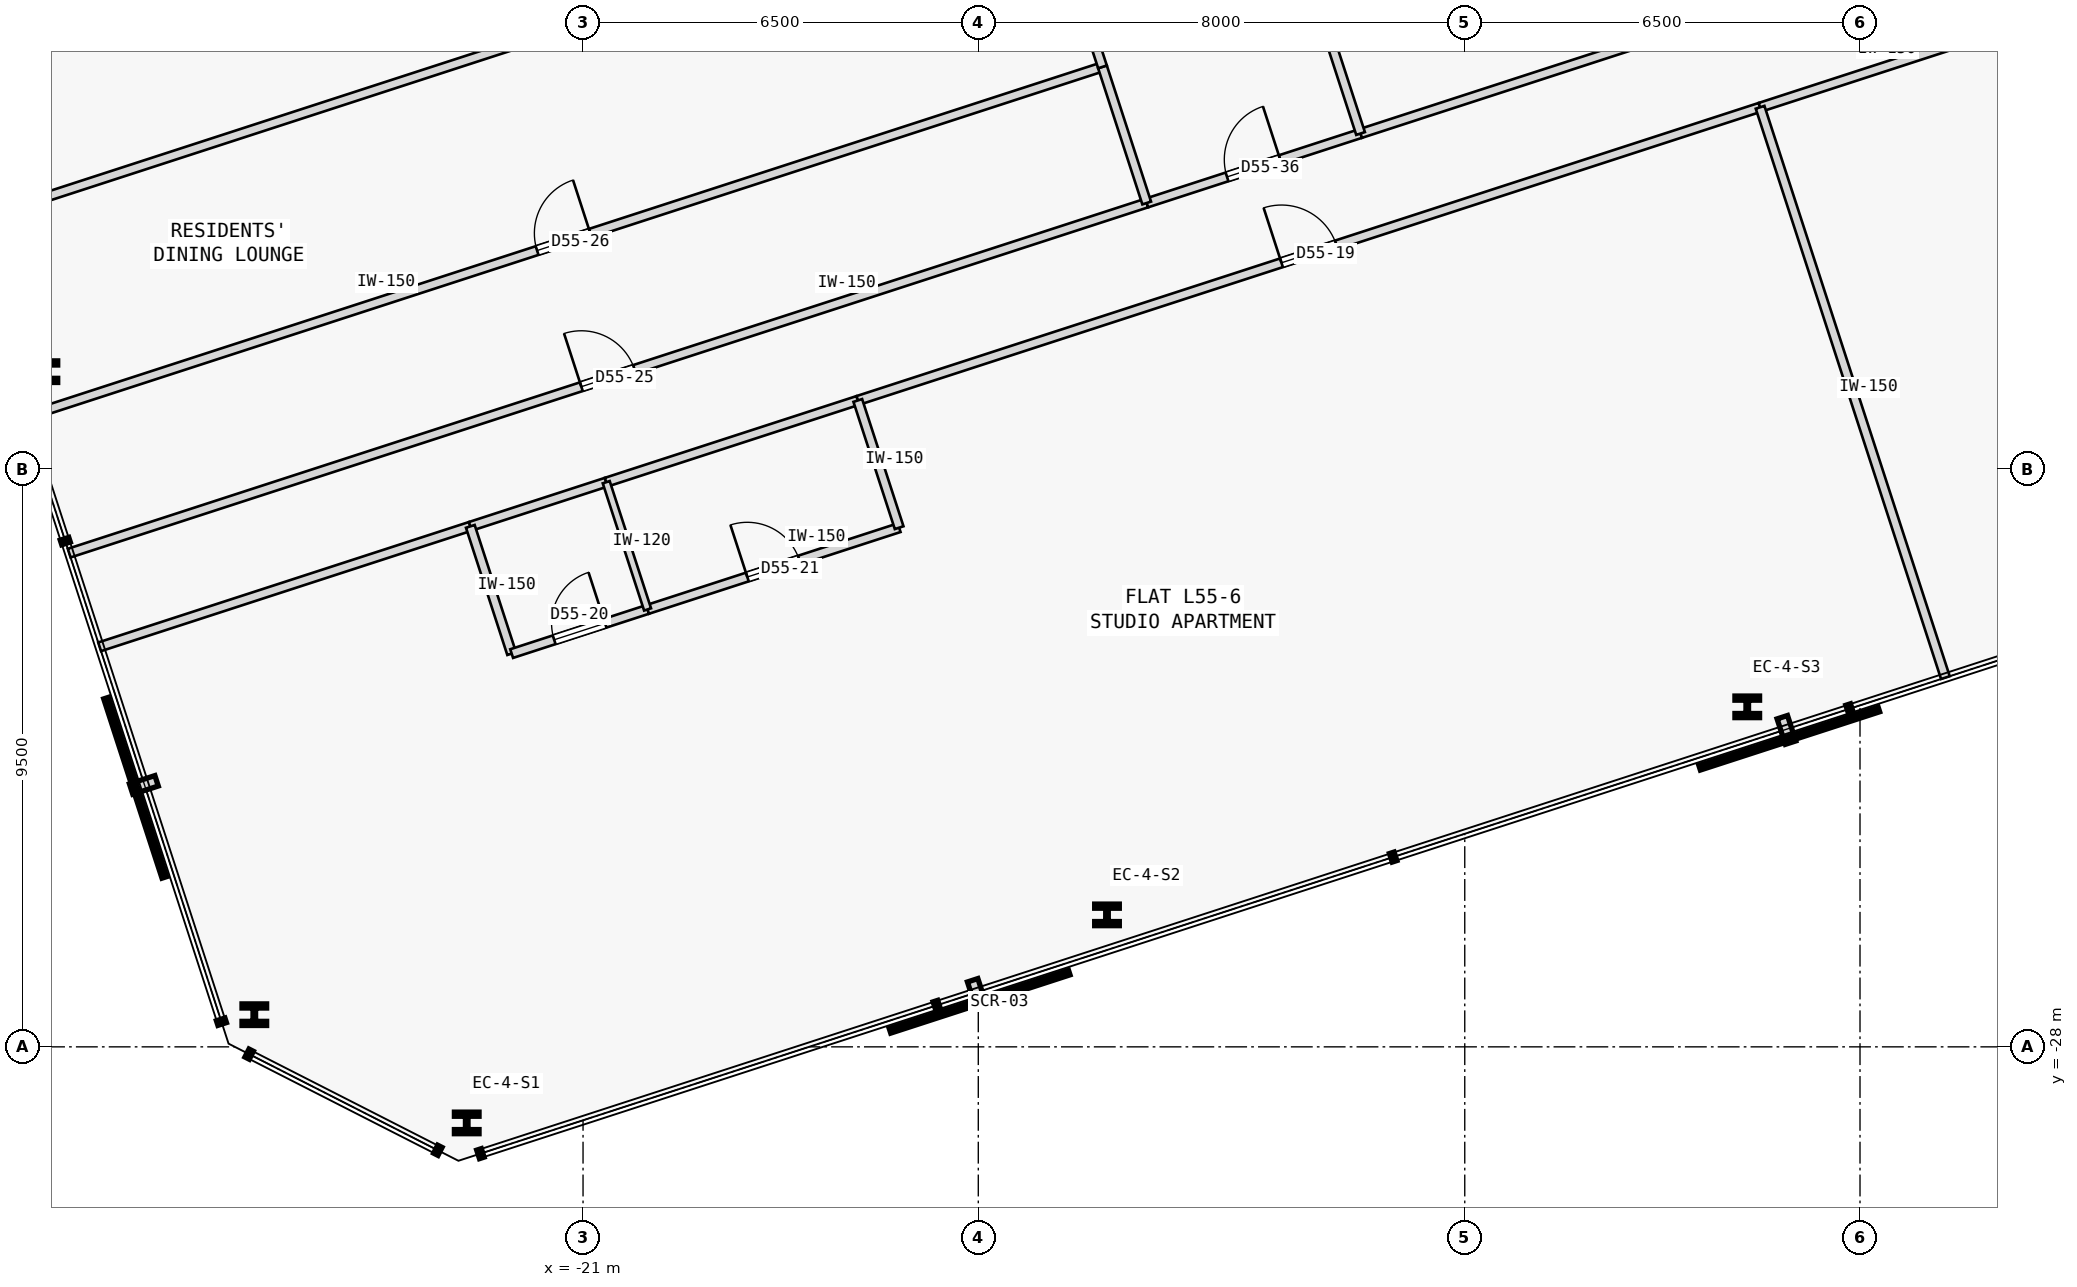
"""IFC4 building model, lengths in metres.
Left out: names, types, materials, properties, quantities, classifications, styles, units other than length and angle.
Written with IfcOpenShell. Run it as: python <this file> out.ifc"""

import sys

from ifc_helpers import new_model, si_unit, direction, frame, frame_2d, origin, origin_2d, place, context, subcontext, project, spatial, rectangle, i_section, extrude, element, fill, save


model = new_model("IFC4")
c1 = context("Model", 3, precision=1e-05, world=origin(), true_north=direction((0.0, 1.0)))
c2 = subcontext(c1, "Body", "Model", "MODEL_VIEW")
j1 = project(units=[si_unit("LENGTHUNIT", "METRE"), si_unit("PLANEANGLEUNIT", "RADIAN")], contexts=[c1])
p1 = place(None, origin())
s1 = spatial("IfcSite", under=j1, at=p1, CompositionType="ELEMENT")
p2 = place(p1, origin())
s2 = spatial("IfcBuilding", under=s1, at=p2, CompositionType="ELEMENT")
p3 = place(p2, frame((0.0, 0.0, 210.9)))
s3 = spatial("IfcBuildingStorey", under=s2, at=p3, CompositionType="ELEMENT", Elevation=210.9)
for number, where, z_axis, x_axis in (
    (1, (-22.913, -29.251, 0.0), (0.0, 0.0, 1.0), (1.0, 0.0, 0.0)),
    (2, (-12.384, -25.83, 0.0), (0.0, 0.0, 1.0), (1.0, 0.0, 0.0)),
    (3, (-1.854, -22.409, 0.0), (0.0, 0.0, 1.0), (1.0, 0.0, 0.0)),
    (4, (-29.842, -16.897, 0.0), (0.0, 0.0, 1.0), (1.0, 0.0, 0.0)),
    (5, (-26.406, -27.471, 0.0), (0.0, 0.0, 1.0), (1.0, 0.0, 0.0)),
):
    element("IfcColumn", number, at=place(p3, frame(where, z_axis=z_axis, x_axis=x_axis)), inside=s3, PredefinedType="COLUMN", context=c2, shape_type="SweptSolid", body=[
        extrude(i_section(OverallWidth=0.405, OverallDepth=0.355, WebThickness=0.042, FlangeThickness=0.068, FilletRadius=0.015, at=origin_2d()), origin(), (0.0, 0.0, 1.0), 3.35),
    ])
p4 = place(p3, frame((-28.95, -21.421, 0.0), z_axis=(0.0, 0.0, 1.0), x_axis=(0.951048062645, 0.309043010825, 0.0)))
e6 = element("IfcWall", 6, at=p4, inside=s3, PredefinedType="PARTITIONING", context=c2, shape_type="SweptSolid", body=[
    extrude(rectangle(XDim=6.41, YDim=0.15, at=frame_2d((3.205, 0.0))), origin(), (0.0, 0.0, 1.0), 3.125),
])
p5 = place(p3, frame((-16.482, -17.37, 0.0), z_axis=(0.0, 0.0, 1.0), x_axis=(0.9510563751, 0.309017428929, 0.0)))
e7 = element("IfcWall", 7, at=p5, inside=s3, PredefinedType="PARTITIONING", context=c2, shape_type="SweptSolid", body=[
    extrude(rectangle(XDim=15.602, YDim=0.15, at=frame_2d((7.801, 0.0))), origin(), (0.0, 0.0, 1.0), 3.125),
])
p6 = place(p5, frame((7.326, 0.0, 0.0)))
e8 = element("IfcOpeningElement", 8, at=p6, cuts=e7, PredefinedType="OPENING", context=c2, shape_type="SweptSolid", body=[
    extrude(rectangle(XDim=0.95, YDim=2.15, at=frame_2d((0.475, 1.075))), frame((0.0, 0.085, 0.0), z_axis=(0.0, -1.0, 0.0), x_axis=(1.0, 0.0, 0.0)), (0.0, 0.0, 1.0), 0.17),
])
p7 = place(p3, frame((-22.854, -19.44, 0.0), z_axis=(0.0, 0.0, 1.0), x_axis=(0.951076048914, 0.308956872689, 0.0)))
e9 = element("IfcWall", 9, at=p7, inside=s3, PredefinedType="PARTITIONING", context=c2, shape_type="SweptSolid", body=[
    extrude(rectangle(XDim=2.35, YDim=0.15, at=frame_2d((1.175, 0.0))), origin(), (0.0, 0.0, 1.0), 3.125),
])
p8 = place(p3, frame((-20.619, -18.714, 0.0), z_axis=(0.0, 0.0, 1.0), x_axis=(0.951052627573, 0.309028962374, 0.0)))
e10 = element("IfcWall", 10, at=p8, inside=s3, PredefinedType="PARTITIONING", context=c2, shape_type="SweptSolid", body=[
    extrude(rectangle(XDim=4.35, YDim=0.15, at=frame_2d((2.175, 0.0))), origin(), (0.0, 0.0, 1.0), 3.125),
])
p9 = place(p3, frame((-1.643, -12.549, 0.0), z_axis=(0.0, 0.0, 1.0), x_axis=(0.951058161173, 0.309011931914, 0.0)))
e11 = element("IfcWall", 11, at=p9, inside=s3, PredefinedType="PARTITIONING", context=c2, shape_type="SweptSolid", body=[
    extrude(rectangle(XDim=7.297, YDim=0.15, at=frame_2d((3.648, 0.0))), origin(), (0.0, 0.0, 1.0), 3.125),
])
p10 = place(p3, frame((-29.45, -19.881, 0.0), z_axis=(0.0, 0.0, 1.0), x_axis=(0.95105650271, 0.309017036186, 0.0)))
e12 = element("IfcWall", 12, at=p10, inside=s3, PredefinedType="PARTITIONING", context=c2, shape_type="SweptSolid", body=[
    extrude(rectangle(XDim=18.632, YDim=0.15, at=frame_2d((9.316, 0.0))), origin(), (0.0, 0.0, 1.0), 3.125),
])
p11 = place(p10, frame((8.856, 0.0, 0.0)))
e13 = element("IfcOpeningElement", 13, at=p11, cuts=e12, PredefinedType="OPENING", context=c2, shape_type="SweptSolid", body=[
    extrude(rectangle(XDim=0.92, YDim=2.15, at=frame_2d((0.46, 1.075))), frame((0.0, 0.085, 0.0), z_axis=(0.0, -1.0, 0.0), x_axis=(1.0, 0.0, 0.0)), (0.0, 0.0, 1.0), 0.17),
])
p12 = place(p3, frame((-11.73, -14.123, 0.0), z_axis=(0.0, 0.0, 1.0), x_axis=(0.951052502763, 0.309029346483, 0.0)))
e14 = element("IfcWall", 14, at=p12, inside=s3, PredefinedType="PARTITIONING", context=c2, shape_type="SweptSolid", body=[
    extrude(rectangle(XDim=3.698, YDim=0.15, at=frame_2d((1.849, 0.0))), origin(), (0.0, 0.0, 1.0), 3.125),
])
p13 = place(p12, frame((1.389, 0.0, 0.0)))
e15 = element("IfcOpeningElement", 15, at=p13, cuts=e14, PredefinedType="OPENING", context=c2, shape_type="SweptSolid", body=[
    extrude(rectangle(XDim=0.92, YDim=2.15, at=frame_2d((0.46, 1.075))), frame((0.0, 0.085, 0.0), z_axis=(0.0, -1.0, 0.0), x_axis=(1.0, 0.0, 0.0)), (0.0, 0.0, 1.0), 0.17),
])
p14 = place(p3, frame((-8.213, -12.98, 0.0), z_axis=(0.0, 0.0, 1.0), x_axis=(0.951058260096, 0.309011627456, 0.0)))
e16 = element("IfcWall", 16, at=p14, inside=s3, PredefinedType="PARTITIONING", context=c2, shape_type="SweptSolid", body=[
    extrude(rectangle(XDim=4.746, YDim=0.15, at=frame_2d((2.373, 0.0))), origin(), (0.0, 0.0, 1.0), 3.125),
])
p15 = place(p3, frame((-22.174, -21.533, 0.0), z_axis=(0.0, 0.0, 1.0), x_axis=(-0.309028364152, 0.951052821956, 0.0)))
e17 = element("IfcWall", 17, at=p15, inside=s3, PredefinedType="PARTITIONING", context=c2, shape_type="SweptSolid", body=[
    extrude(rectangle(XDim=2.2, YDim=0.15, at=frame_2d((1.1, 0.0))), origin(), (0.0, 0.0, 1.0), 3.125),
])
p16 = place(p3, frame((-22.174, -21.533, 0.0), z_axis=(0.0, 0.0, 1.0), x_axis=(0.951045519245, 0.309050837767, 0.0)))
e18 = element("IfcWall", 18, at=p16, inside=s3, PredefinedType="PARTITIONING", context=c2, shape_type="SweptSolid", body=[
    extrude(rectangle(XDim=2.35, YDim=0.15, at=frame_2d((1.175, 0.0))), origin(), (0.0, 0.0, 1.0), 3.125),
])
p17 = place(p16, frame((0.735, 0.0, 0.0)))
e19 = element("IfcOpeningElement", 19, at=p17, cuts=e18, PredefinedType="OPENING", context=c2, shape_type="SweptSolid", body=[
    extrude(rectangle(XDim=0.88, YDim=2.15, at=frame_2d((0.44, 1.075))), frame((0.0, 0.085, 0.0), z_axis=(0.0, -1.0, 0.0), x_axis=(1.0, 0.0, 0.0)), (0.0, 0.0, 1.0), 0.17),
])
p18 = place(p3, frame((-19.939, -20.807, 0.0), z_axis=(0.0, 0.0, 1.0), x_axis=(0.951052627573, 0.309028962374, 0.0)))
e20 = element("IfcWall", 20, at=p18, inside=s3, PredefinedType="PARTITIONING", context=c2, shape_type="SweptSolid", body=[
    extrude(rectangle(XDim=4.35, YDim=0.15, at=frame_2d((2.175, 0.0))), origin(), (0.0, 0.0, 1.0), 3.125),
])
p19 = place(p18, frame((1.725, 0.0, 0.0)))
e21 = element("IfcOpeningElement", 21, at=p19, cuts=e20, PredefinedType="OPENING", context=c2, shape_type="SweptSolid", body=[
    extrude(rectangle(XDim=0.9, YDim=2.15, at=frame_2d((0.45, 1.075))), frame((0.0, 0.085, 0.0), z_axis=(0.0, -1.0, 0.0), x_axis=(1.0, 0.0, 0.0)), (0.0, 0.0, 1.0), 0.17),
])
p20 = place(p3, frame((-15.802, -19.462, 0.0), z_axis=(0.0, 0.0, 1.0), x_axis=(-0.309060979314, 0.951042223598, 0.0)))
e22 = element("IfcWall", 22, at=p20, inside=s3, PredefinedType="PARTITIONING", context=c2, shape_type="SweptSolid", body=[
    extrude(rectangle(XDim=2.2, YDim=0.15, at=frame_2d((1.1, 0.0))), origin(), (0.0, 0.0, 1.0), 3.125),
])
p21 = place(p3, frame((1.404, -21.928, 0.0), z_axis=(0.0, 0.0, 1.0), x_axis=(-0.309022258842, 0.95105480575, 0.0)))
e23 = element("IfcWall", 23, at=p21, inside=s3, PredefinedType="PARTITIONING", context=c2, shape_type="SweptSolid", body=[
    extrude(rectangle(XDim=9.862, YDim=0.15, at=frame_2d((4.931, 0.0))), origin(), (0.0, 0.0, 1.0), 3.125),
])
p22 = place(p3, frame((-19.939, -20.807, 0.0), z_axis=(0.0, 0.0, 1.0), x_axis=(-0.309060979314, 0.951042223598, 0.0)))
e24 = element("IfcWall", 24, at=p22, inside=s3, PredefinedType="PARTITIONING", context=c2, shape_type="SweptSolid", body=[
    extrude(rectangle(XDim=2.2, YDim=0.12, at=frame_2d((1.1, 0.0))), origin(), (0.0, 0.0, 1.0), 3.125),
])
p23 = place(p3, frame((-30.178, -17.642, 0.0), z_axis=(0.0, 0.0, 1.0), x_axis=(0.95105650271, 0.309017036186, 0.0)))
e25 = element("IfcWall", 25, at=p23, inside=s3, PredefinedType="PARTITIONING", context=c2, shape_type="SweptSolid", body=[
    extrude(rectangle(XDim=18.632, YDim=0.15, at=frame_2d((9.316, 0.0))), origin(), (0.0, 0.0, 1.0), 3.125),
])
p24 = place(p23, frame((8.856, 0.0, 0.0)))
e26 = element("IfcOpeningElement", 26, at=p24, cuts=e25, PredefinedType="OPENING", context=c2, shape_type="SweptSolid", body=[
    extrude(rectangle(XDim=0.92, YDim=2.15, at=frame_2d((0.46, 1.075))), frame((0.0, 0.085, 0.0), z_axis=(0.0, -1.0, 0.0), x_axis=(1.0, 0.0, 0.0)), (0.0, 0.0, 1.0), 0.17),
])
p25 = place(p3, frame((-11.73, -14.123, 0.0), z_axis=(0.0, 0.0, 1.0), x_axis=(-0.309062621189, 0.951041690035, 0.0)))
e27 = element("IfcWall", 27, at=p25, inside=s3, PredefinedType="PARTITIONING", context=c2, shape_type="SweptSolid", body=[
    extrude(rectangle(XDim=2.354, YDim=0.15, at=frame_2d((1.177, 0.0))), origin(), (0.0, 0.0, 1.0), 3.125),
])
p26 = place(p3, frame((-31.208, -14.471, 0.0), z_axis=(0.0, 0.0, 1.0), x_axis=(0.951057753948, 0.309013185244, 0.0)))
e28 = element("IfcWall", 28, at=p26, inside=s3, PredefinedType="PARTITIONING", context=c2, shape_type="SweptSolid", body=[
    extrude(rectangle(XDim=18.632, YDim=0.15, at=frame_2d((9.316, 0.0))), origin(), (0.0, 0.0, 1.0), 3.125),
])
p27 = place(p3, frame((-12.458, -11.884, 0.0), z_axis=(0.0, 0.0, 1.0), x_axis=(-0.308946982245, 0.951079261766, 0.0)))
e29 = element("IfcWall", 29, at=p27, inside=s3, PredefinedType="PARTITIONING", context=c2, shape_type="SweptSolid", body=[
    extrude(rectangle(XDim=3.334, YDim=0.15, at=frame_2d((1.667, 0.0))), origin(), (0.0, 0.0, 1.0), 3.125),
])
p28 = place(p3, frame((-8.213, -12.98, 0.0), z_axis=(0.0, 0.0, 1.0), x_axis=(-0.309017065592, 0.951056493155, 0.0)))
e30 = element("IfcWall", 30, at=p28, inside=s3, PredefinedType="PARTITIONING", context=c2, shape_type="SweptSolid", body=[
    extrude(rectangle(XDim=7.76, YDim=0.15, at=frame_2d((3.88, 0.0))), origin(), (0.0, 0.0, 1.0), 3.125),
])
p29 = place(p6, origin())
e31 = element("IfcDoor", 31, at=p29, inside=s3, OperationType="SINGLE_SWING_LEFT", PredefinedType="DOOR", context=c2, shape_type="SweptSolid", body=[
    extrude(rectangle(XDim=0.95, YDim=2.15, at=frame_2d((0.475, 1.075))), frame((0.0, 0.025, 0.0), z_axis=(0.0, -1.0, 0.0), x_axis=(1.0, 0.0, 0.0)), (0.0, 0.0, 1.0), 0.05),
])
fill(e8, e31)
p30 = place(p17, origin())
e32 = element("IfcDoor", 32, at=p30, inside=s3, OperationType="SINGLE_SWING_RIGHT", PredefinedType="DOOR", context=c2, shape_type="SweptSolid", body=[
    extrude(rectangle(XDim=0.88, YDim=2.15, at=frame_2d((0.44, 1.075))), frame((0.0, 0.025, 0.0), z_axis=(0.0, -1.0, 0.0), x_axis=(1.0, 0.0, 0.0)), (0.0, 0.0, 1.0), 0.05),
])
fill(e19, e32)
p31 = place(p19, origin())
e33 = element("IfcDoor", 33, at=p31, inside=s3, OperationType="SINGLE_SWING_LEFT", PredefinedType="DOOR", context=c2, shape_type="SweptSolid", body=[
    extrude(rectangle(XDim=0.9, YDim=2.15, at=frame_2d((0.45, 1.075))), frame((0.0, 0.025, 0.0), z_axis=(0.0, -1.0, 0.0), x_axis=(1.0, 0.0, 0.0)), (0.0, 0.0, 1.0), 0.05),
])
fill(e21, e33)
p32 = place(p11, origin())
e34 = element("IfcDoor", 34, at=p32, inside=s3, OperationType="SINGLE_SWING_LEFT", PredefinedType="DOOR", context=c2, shape_type="SweptSolid", body=[
    extrude(rectangle(XDim=0.92, YDim=2.15, at=frame_2d((0.46, 1.075))), frame((0.0, 0.025, 0.0), z_axis=(0.0, -1.0, 0.0), x_axis=(1.0, 0.0, 0.0)), (0.0, 0.0, 1.0), 0.05),
])
fill(e13, e34)
p33 = place(p24, origin())
e35 = element("IfcDoor", 35, at=p33, inside=s3, OperationType="SINGLE_SWING_RIGHT", PredefinedType="DOOR", context=c2, shape_type="SweptSolid", body=[
    extrude(rectangle(XDim=0.92, YDim=2.15, at=frame_2d((0.46, 1.075))), frame((0.0, 0.025, 0.0), z_axis=(0.0, -1.0, 0.0), x_axis=(1.0, 0.0, 0.0)), (0.0, 0.0, 1.0), 0.05),
])
fill(e26, e35)
p34 = place(p13, origin())
e36 = element("IfcDoor", 36, at=p34, inside=s3, OperationType="SINGLE_SWING_RIGHT", PredefinedType="DOOR", context=c2, shape_type="SweptSolid", body=[
    extrude(rectangle(XDim=0.92, YDim=2.15, at=frame_2d((0.46, 1.075))), frame((0.0, 0.025, 0.0), z_axis=(0.0, -1.0, 0.0), x_axis=(1.0, 0.0, 0.0)), (0.0, 0.0, 1.0), 0.05),
])
fill(e15, e36)
save(model, sys.argv[1])
